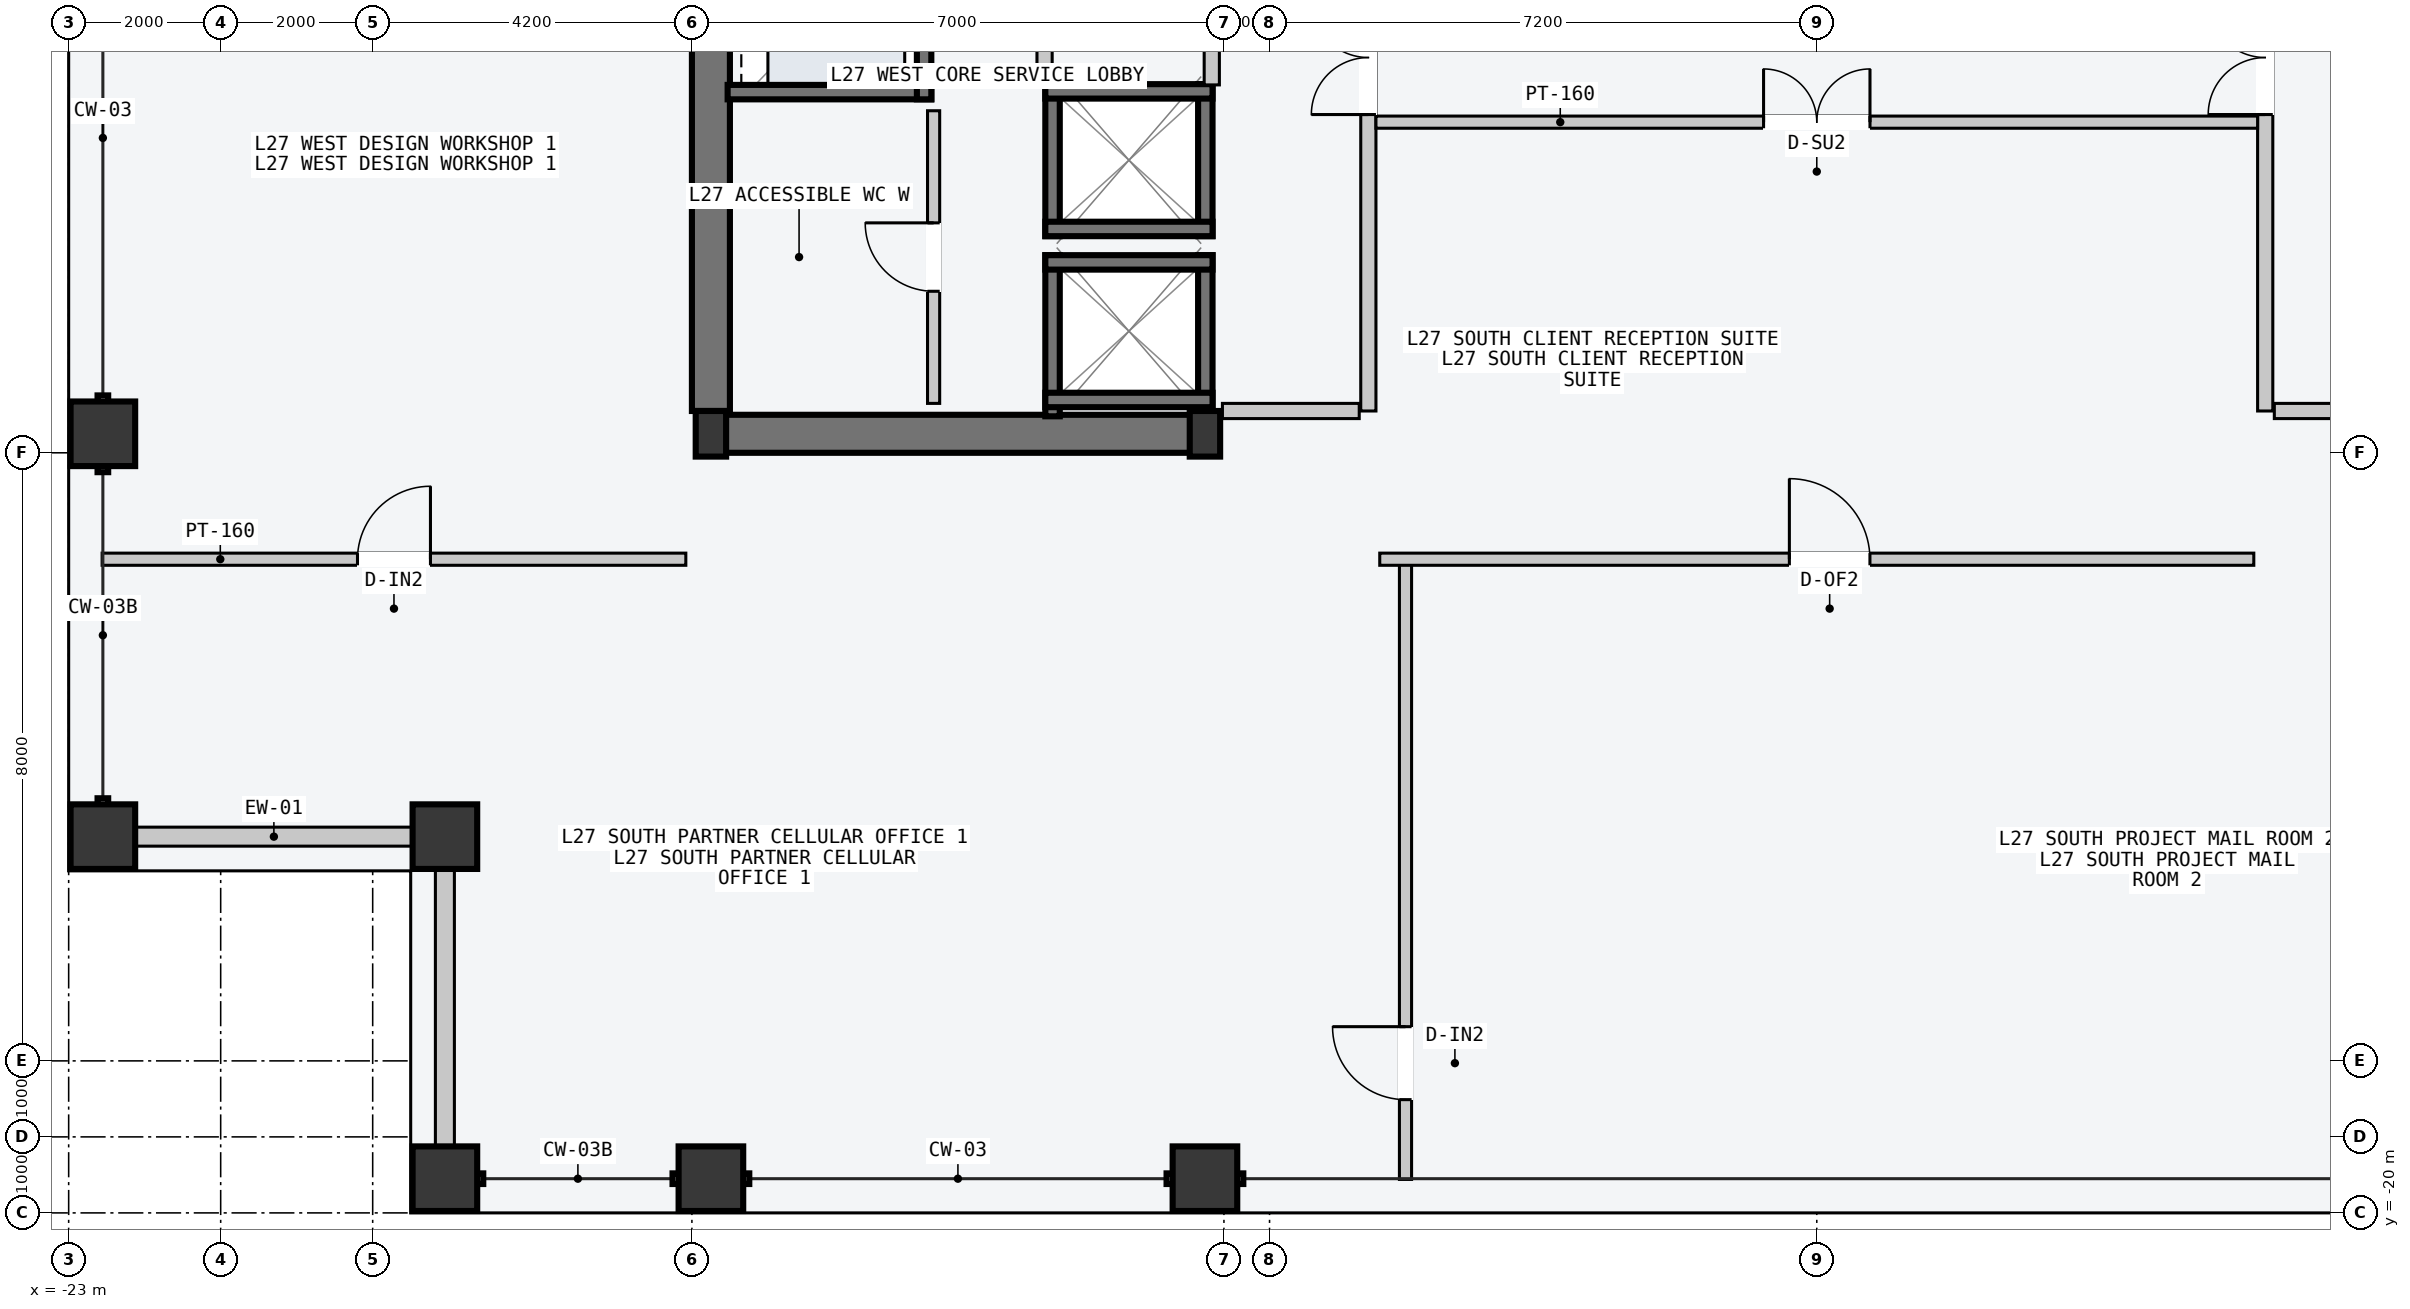
"""IFC4 building model, lengths in metres.
Left out: names, types, materials, properties, quantities, classifications, styles, units other than length and angle.
Written with IfcOpenShell. Run it as: python <this file> out.ifc"""

import sys

from ifc_helpers import new_model, si_unit, direction, frame, frame_2d, origin, origin_2d, place, context, subcontext, project, spatial, rectangle, hollow_rectangle, i_section, extrude, element, fill, save


model = new_model("IFC4")
c1 = context("Model", 3, precision=1e-05, world=origin(), true_north=direction((0.0, 1.0)))
c2 = subcontext(c1, "Body", "Model", "MODEL_VIEW")
j1 = project(units=[si_unit("LENGTHUNIT", "METRE"), si_unit("PLANEANGLEUNIT", "RADIAN")], contexts=[c1])
p1 = place(None, origin())
s1 = spatial("IfcSite", under=j1, at=p1, CompositionType="ELEMENT")
p2 = place(p1, origin())
s2 = spatial("IfcBuilding", under=s1, at=p2, CompositionType="ELEMENT")
p3 = place(p2, frame((0.0, 0.0, 106.2)))
s3 = spatial("IfcBuildingStorey", under=s2, at=p3, CompositionType="ELEMENT", Elevation=106.2)
p4 = place(p3, frame((-14.53, -9.75, -0.2), z_axis=(0.0, 0.0, 1.0), x_axis=(1.0, 0.0, 0.0)))
e1 = element("IfcWall", 1, at=p4, inside=s3, PredefinedType="SHEAR", context=c2, shape_type="SweptSolid", body=[
    extrude(rectangle(XDim=6.46, YDim=0.5, at=frame_2d((3.23, 0.0))), origin(), (0.0, 0.0, 1.0), 3.6),
])
p5 = place(p3, frame((-14.55, -9.45, -0.2), z_axis=(0.0, 0.0, 1.0), x_axis=(0.0, 1.0, 0.0)))
e2 = element("IfcWall", 2, at=p5, inside=s3, PredefinedType="SHEAR", context=c2, shape_type="SweptSolid", body=[
    extrude(rectangle(XDim=9.15, YDim=0.5, at=frame_2d((4.575, 0.0))), origin(), (0.0, 0.0, 1.0), 3.6),
])
for number, where, z_axis, x_axis in (
    (3, (-14.55, -9.75, 0.0), (0.0, 0.0, 1.0), (1.0, 0.0, 0.0)),
    (4, (-8.05, -9.75, 0.0), (0.0, 0.0, 1.0), (1.0, 0.0, 0.0)),
):
    element("IfcColumn", number, at=place(p3, frame(where, z_axis=z_axis, x_axis=x_axis)), inside=s3, PredefinedType="COLUMN", context=c2, shape_type="SweptSolid", body=[
        extrude(i_section(OverallWidth=0.4, OverallDepth=0.6, WebThickness=0.022, FlangeThickness=0.036, at=origin_2d()), origin(), (0.0, 0.0, 1.0), 3.6),
    ])
for number, where, z_axis, x_axis in (
    (5, (-18.05, -19.55, 0.0), (0.0, 0.0, 1.0), (1.0, 0.0, 0.0)),
    (6, (-14.55, -19.55, 0.0), (0.0, 0.0, 1.0), (1.0, 0.0, 0.0)),
    (7, (-8.05, -19.55, 0.0), (0.0, 0.0, 1.0), (1.0, 0.0, 0.0)),
    (8, (-22.55, -15.05, 0.0), (0.0, 0.0, 1.0), (0.0, 1.0, 0.0)),
    (9, (-22.55, -9.75, 0.0), (0.0, 0.0, 1.0), (0.0, 1.0, 0.0)),
    (10, (-18.05, -15.05, 0.0), (0.0, 0.0, 1.0), (1.0, 0.0, 0.0)),
):
    element("IfcColumn", number, at=place(p3, frame(where, z_axis=z_axis, x_axis=x_axis)), inside=s3, PredefinedType="COLUMN", context=c2, shape_type="SweptSolid", body=[
        extrude(hollow_rectangle(XDim=0.85, YDim=0.85, WallThickness=0.04, at=origin_2d()), origin(), (0.0, 0.0, 1.0), 3.6),
    ])
for number, where, z_axis, x_axis in (
    (11, (-22.115, -15.05, 0.0), (0.0, 0.0, 1.0), (1.0, 0.0, 0.0)),
    (12, (-18.05, -19.115, 0.0), (0.0, 0.0, 1.0), (0.0, 1.0, 0.0)),
):
    element("IfcWall", number, at=place(p3, frame(where, z_axis=z_axis, x_axis=x_axis)), inside=s3, PredefinedType="STANDARD", context=c2, shape_type="SweptSolid", body=[
        extrude(rectangle(XDim=3.63, YDim=0.25, at=frame_2d((1.815, 0.0))), origin(), (0.0, 0.0, 1.0), 2.75),
    ])
for number, where, z_axis, x_axis in (
    (13, (-8.045, -9.52, -0.2), (0.0, 0.0, 1.0), (0.0, 1.0, 0.0)),
    (14, (-10.055, -9.52, -0.2), (0.0, 0.0, 1.0), (0.0, 1.0, 0.0)),
):
    element("IfcWall", number, at=place(p3, frame(where, z_axis=z_axis, x_axis=x_axis)), inside=s3, PredefinedType="SOLIDWALL", context=c2, shape_type="SweptSolid", body=[
        extrude(rectangle(XDim=2.12, YDim=0.19, at=frame_2d((1.06, 0.0))), origin(), (0.0, 0.0, 1.0), 3.6),
    ])
for number, where, z_axis, x_axis in (
    (15, (-10.15, -7.495, -0.2), (0.0, 0.0, 1.0), (1.0, 0.0, 0.0)),
    (16, (-10.15, -9.305, -0.2), (0.0, 0.0, 1.0), (1.0, 0.0, 0.0)),
):
    element("IfcWall", number, at=place(p3, frame(where, z_axis=z_axis, x_axis=x_axis)), inside=s3, PredefinedType="SOLIDWALL", context=c2, shape_type="SweptSolid", body=[
        extrude(rectangle(XDim=2.2, YDim=0.19, at=frame_2d((1.1, 0.0))), origin(), (0.0, 0.0, 1.0), 3.6),
    ])
for number, where, z_axis, x_axis in (
    (17, (-8.045, -7.15, -0.2), (0.0, 0.0, 1.0), (0.0, 1.0, 0.0)),
    (18, (-10.055, -7.15, -0.2), (0.0, 0.0, 1.0), (0.0, 1.0, 0.0)),
):
    element("IfcWall", number, at=place(p3, frame(where, z_axis=z_axis, x_axis=x_axis)), inside=s3, PredefinedType="SOLIDWALL", context=c2, shape_type="SweptSolid", body=[
        extrude(rectangle(XDim=2.0, YDim=0.19, at=frame_2d((1.0, 0.0))), origin(), (0.0, 0.0, 1.0), 3.6),
    ])
for number, where, z_axis, x_axis in (
    (19, (-10.15, -5.245, -0.2), (0.0, 0.0, 1.0), (1.0, 0.0, 0.0)),
    (20, (-10.15, -7.055, -0.2), (0.0, 0.0, 1.0), (1.0, 0.0, 0.0)),
):
    element("IfcWall", number, at=place(p3, frame(where, z_axis=z_axis, x_axis=x_axis)), inside=s3, PredefinedType="SOLIDWALL", context=c2, shape_type="SweptSolid", body=[
        extrude(rectangle(XDim=2.2, YDim=0.19, at=frame_2d((1.1, 0.0))), origin(), (0.0, 0.0, 1.0), 3.6),
    ])
p6 = place(p3, frame((-14.33, -5.255, -0.2), z_axis=(0.0, 0.0, 1.0), x_axis=(1.0, 0.0, 0.0)))
e21 = element("IfcWall", 21, at=p6, inside=s3, PredefinedType="SOLIDWALL", context=c2, shape_type="SweptSolid", body=[
    extrude(rectangle(XDim=2.68, YDim=0.19, at=frame_2d((1.34, 0.0))), origin(), (0.0, 0.0, 1.0), 3.6),
])
p7 = place(p3, frame((-11.745, -5.35, -0.2), z_axis=(0.0, 0.0, 1.0), x_axis=(0.0, 1.0, 0.0)))
e22 = element("IfcWall", 22, at=p7, inside=s3, PredefinedType="SOLIDWALL", context=c2, shape_type="SweptSolid", body=[
    extrude(rectangle(XDim=2.6, YDim=0.19, at=frame_2d((1.3, 0.0))), origin(), (0.0, 0.0, 1.0), 3.6),
])
p8 = place(p3, frame((-5.9, -9.45, 0.0), z_axis=(0.0, 0.0, 1.0), x_axis=(0.0, 1.0, 0.0)))
e23 = element("IfcWall", 23, at=p8, inside=s3, PredefinedType="PARTITIONING", context=c2, shape_type="SweptSolid", body=[
    extrude(rectangle(XDim=10.5, YDim=0.2, at=frame_2d((5.25, 0.0))), origin(), (0.0, 0.0, 1.0), 3.4),
])
p9 = place(p8, frame((3.9, 0.0, 0.0)))
e24 = element("IfcOpeningElement", 24, at=p9, cuts=e23, PredefinedType="OPENING", context=c2, shape_type="SweptSolid", body=[
    extrude(rectangle(XDim=1.5, YDim=2.2, at=frame_2d((0.75, 1.1))), frame((0.0, 0.11, 0.0), z_axis=(0.0, -1.0, 0.0), x_axis=(1.0, 0.0, 0.0)), (0.0, 0.0, 1.0), 0.22),
])
p10 = place(p3, frame((-6.02, -9.45, 0.0), z_axis=(0.0, 0.0, 1.0), x_axis=(-1.0, 0.0, 0.0)))
e25 = element("IfcWall", 25, at=p10, inside=s3, PredefinedType="PARTITIONING", context=c2, shape_type="SweptSolid", body=[
    extrude(rectangle(XDim=1.8, YDim=0.2, at=frame_2d((0.9, 0.0))), origin(), (0.0, 0.0, 1.0), 3.4),
])
for number, where, z_axis, x_axis in (
    (26, (-7.96, -5.16, 0.0), (0.0, 0.0, 1.0), (0.0, 1.0, 0.0)),
    (27, (-10.16, -5.16, 0.0), (0.0, 0.0, 1.0), (0.0, 1.0, 0.0)),
):
    element("IfcWall", number, at=place(p3, frame(where, z_axis=z_axis, x_axis=x_axis)), inside=s3, PredefinedType="PARTITIONING", context=c2, shape_type="SweptSolid", body=[
        extrude(rectangle(XDim=2.44, YDim=0.2, at=frame_2d((1.22, 0.0))), origin(), (0.0, 0.0, 1.0), 3.4),
    ])
p11 = place(p3, frame((-11.62, -9.35, 0.0), z_axis=(0.0, 0.0, 1.0), x_axis=(0.0, 1.0, 0.0)))
e28 = element("IfcWall", 28, at=p11, inside=s3, PredefinedType="PARTITIONING", context=c2, shape_type="SweptSolid", body=[
    extrude(rectangle(XDim=3.85, YDim=0.16, at=frame_2d((1.925, 0.0))), origin(), (0.0, 0.0, 1.0), 3.4),
])
p12 = place(p11, frame((1.475, 0.0, 0.0)))
e29 = element("IfcOpeningElement", 29, at=p12, cuts=e28, PredefinedType="OPENING", context=c2, shape_type="SweptSolid", body=[
    extrude(rectangle(XDim=0.9, YDim=2.15, at=frame_2d((0.45, 1.075))), frame((0.0, 0.09, 0.0), z_axis=(0.0, -1.0, 0.0), x_axis=(1.0, 0.0, 0.0)), (0.0, 0.0, 1.0), 0.18),
])
p13 = place(p3, frame((5.9, -9.45, 0.0), z_axis=(0.0, 0.0, 1.0), x_axis=(0.0, 1.0, 0.0)))
e30 = element("IfcWall", 30, at=p13, inside=s3, PredefinedType="PARTITIONING", context=c2, shape_type="SweptSolid", body=[
    extrude(rectangle(XDim=18.9, YDim=0.2, at=frame_2d((9.45, 0.0))), origin(), (0.0, 0.0, 1.0), 3.4),
])
p14 = place(p13, frame((3.9, 0.0, 0.0)))
e31 = element("IfcOpeningElement", 31, at=p14, cuts=e30, PredefinedType="OPENING", context=c2, shape_type="SweptSolid", body=[
    extrude(rectangle(XDim=1.5, YDim=2.2, at=frame_2d((0.75, 1.1))), frame((0.0, 0.11, 0.0), z_axis=(0.0, -1.0, 0.0), x_axis=(1.0, 0.0, 0.0)), (0.0, 0.0, 1.0), 0.22),
])
p15 = place(p3, frame((6.02, -9.45, 0.0), z_axis=(0.0, 0.0, 1.0), x_axis=(1.0, 0.0, 0.0)))
e32 = element("IfcWall", 32, at=p15, inside=s3, PredefinedType="PARTITIONING", context=c2, shape_type="SweptSolid", body=[
    extrude(rectangle(XDim=1.8, YDim=0.2, at=frame_2d((0.9, 0.0))), origin(), (0.0, 0.0, 1.0), 3.4),
])
p16 = place(p3, frame((-5.8, -5.65, 0.0), z_axis=(0.0, 0.0, 1.0), x_axis=(1.0, 0.0, 0.0)))
e33 = element("IfcWall", 33, at=p16, inside=s3, PredefinedType="PARTITIONING", context=c2, shape_type="SweptSolid", body=[
    extrude(rectangle(XDim=11.6, YDim=0.16, at=frame_2d((5.8, 0.0))), origin(), (0.0, 0.0, 1.0), 3.4),
])
p17 = place(p16, frame((5.1, 0.0, 0.0)))
e34 = element("IfcOpeningElement", 34, at=p17, cuts=e33, PredefinedType="OPENING", context=c2, shape_type="SweptSolid", body=[
    extrude(rectangle(XDim=1.4, YDim=2.2, at=frame_2d((0.7, 1.1))), frame((0.0, 0.09, 0.0), z_axis=(0.0, -1.0, 0.0), x_axis=(1.0, 0.0, 0.0)), (0.0, 0.0, 1.0), 0.18),
])
p18 = place(p3, frame((-5.411, -19.56, 0.0), z_axis=(0.0, 0.0, 1.0), x_axis=(0.0, 1.0, 0.0)))
e35 = element("IfcWall", 35, at=p18, inside=s3, PredefinedType="PARTITIONING", context=c2, shape_type="SweptSolid", body=[
    extrude(rectangle(XDim=8.1, YDim=0.16, at=frame_2d((4.05, 0.0))), origin(), (0.0, 0.0, 1.0), 3.4),
])
p19 = place(p18, frame((1.05, 0.0, 0.0)))
e36 = element("IfcOpeningElement", 36, at=p19, cuts=e35, PredefinedType="OPENING", context=c2, shape_type="SweptSolid", body=[
    extrude(rectangle(XDim=0.96, YDim=2.18, at=frame_2d((0.48, 1.09))), frame((0.0, 0.09, 0.0), z_axis=(0.0, -1.0, 0.0), x_axis=(1.0, 0.0, 0.0)), (0.0, 0.0, 1.0), 0.18),
])
p20 = place(p3, frame((-5.75, -11.4, 0.0), z_axis=(0.0, 0.0, 1.0), x_axis=(1.0, 0.0, 0.0)))
e37 = element("IfcWall", 37, at=p20, inside=s3, PredefinedType="PARTITIONING", context=c2, shape_type="SweptSolid", body=[
    extrude(rectangle(XDim=11.5, YDim=0.16, at=frame_2d((5.75, 0.0))), origin(), (0.0, 0.0, 1.0), 3.4),
])
p21 = place(p20, frame((5.389, 0.0, 0.0)))
e38 = element("IfcOpeningElement", 38, at=p21, cuts=e37, PredefinedType="OPENING", context=c2, shape_type="SweptSolid", body=[
    extrude(rectangle(XDim=1.06, YDim=2.2, at=frame_2d((0.53, 1.1))), frame((0.0, 0.09, 0.0), z_axis=(0.0, -1.0, 0.0), x_axis=(1.0, 0.0, 0.0)), (0.0, 0.0, 1.0), 0.18),
])
p22 = place(p3, frame((-22.56, -11.4, 0.0), z_axis=(0.0, 0.0, 1.0), x_axis=(1.0, 0.0, 0.0)))
e39 = element("IfcWall", 39, at=p22, inside=s3, PredefinedType="PARTITIONING", context=c2, shape_type="SweptSolid", body=[
    extrude(rectangle(XDim=7.68, YDim=0.16, at=frame_2d((3.84, 0.0))), origin(), (0.0, 0.0, 1.0), 3.4),
])
p23 = place(p22, frame((3.36, 0.0, 0.0)))
e40 = element("IfcOpeningElement", 40, at=p23, cuts=e39, PredefinedType="OPENING", context=c2, shape_type="SweptSolid", body=[
    extrude(rectangle(XDim=0.96, YDim=2.18, at=frame_2d((0.48, 1.09))), frame((0.0, 0.09, 0.0), z_axis=(0.0, -1.0, 0.0), x_axis=(1.0, 0.0, 0.0)), (0.0, 0.0, 1.0), 0.18),
])
p24 = place(p9, origin())
e41 = element("IfcDoor", 41, at=p24, inside=s3, OperationType="DOUBLE_DOOR_SINGLE_SWING", PredefinedType="DOOR", context=c2, shape_type="SweptSolid", body=[
    extrude(rectangle(XDim=1.5, YDim=2.2, at=frame_2d((0.75, 1.1))), frame((0.0, 0.025, 0.0), z_axis=(0.0, -1.0, 0.0), x_axis=(1.0, 0.0, 0.0)), (0.0, 0.0, 1.0), 0.05),
])
fill(e24, e41)
p25 = place(p12, origin())
e42 = element("IfcDoor", 42, at=p25, inside=s3, OperationType="SINGLE_SWING_RIGHT", PredefinedType="DOOR", context=c2, shape_type="SweptSolid", body=[
    extrude(rectangle(XDim=0.9, YDim=2.15, at=frame_2d((0.45, 1.075))), frame((0.0, 0.025, 0.0), z_axis=(0.0, -1.0, 0.0), x_axis=(1.0, 0.0, 0.0)), (0.0, 0.0, 1.0), 0.05),
])
fill(e29, e42)
p26 = place(p14, origin())
e43 = element("IfcDoor", 43, at=p26, inside=s3, OperationType="DOUBLE_DOOR_SINGLE_SWING", PredefinedType="DOOR", context=c2, shape_type="SweptSolid", body=[
    extrude(rectangle(XDim=1.5, YDim=2.2, at=frame_2d((0.75, 1.1))), frame((0.0, 0.025, 0.0), z_axis=(0.0, -1.0, 0.0), x_axis=(1.0, 0.0, 0.0)), (0.0, 0.0, 1.0), 0.05),
])
fill(e31, e43)
p27 = place(p17, origin())
e44 = element("IfcDoor", 44, at=p27, inside=s3, OperationType="DOUBLE_DOOR_SINGLE_SWING", PredefinedType="DOOR", context=c2, shape_type="SweptSolid", body=[
    extrude(rectangle(XDim=1.4, YDim=2.2, at=frame_2d((0.7, 1.1))), frame((0.0, 0.025, 0.0), z_axis=(0.0, -1.0, 0.0), x_axis=(1.0, 0.0, 0.0)), (0.0, 0.0, 1.0), 0.05),
])
fill(e34, e44)
p28 = place(p19, origin())
e45 = element("IfcDoor", 45, at=p28, inside=s3, OperationType="SINGLE_SWING_RIGHT", PredefinedType="DOOR", context=c2, shape_type="SweptSolid", body=[
    extrude(rectangle(XDim=0.96, YDim=2.18, at=frame_2d((0.48, 1.09))), frame((0.0, 0.025, 0.0), z_axis=(0.0, -1.0, 0.0), x_axis=(1.0, 0.0, 0.0)), (0.0, 0.0, 1.0), 0.05),
])
fill(e36, e45)
p29 = place(p21, origin())
e46 = element("IfcDoor", 46, at=p29, inside=s3, OperationType="SINGLE_SWING_LEFT", PredefinedType="DOOR", context=c2, shape_type="SweptSolid", body=[
    extrude(rectangle(XDim=1.06, YDim=2.2, at=frame_2d((0.53, 1.1))), frame((0.0, 0.025, 0.0), z_axis=(0.0, -1.0, 0.0), x_axis=(1.0, 0.0, 0.0)), (0.0, 0.0, 1.0), 0.05),
])
fill(e38, e46)
p30 = place(p23, origin())
e47 = element("IfcDoor", 47, at=p30, inside=s3, OperationType="SINGLE_SWING_RIGHT", PredefinedType="DOOR", context=c2, shape_type="SweptSolid", body=[
    extrude(rectangle(XDim=0.96, YDim=2.18, at=frame_2d((0.48, 1.09))), frame((0.0, 0.025, 0.0), z_axis=(0.0, -1.0, 0.0), x_axis=(1.0, 0.0, 0.0)), (0.0, 0.0, 1.0), 0.05),
])
fill(e40, e47)
save(model, sys.argv[1])
